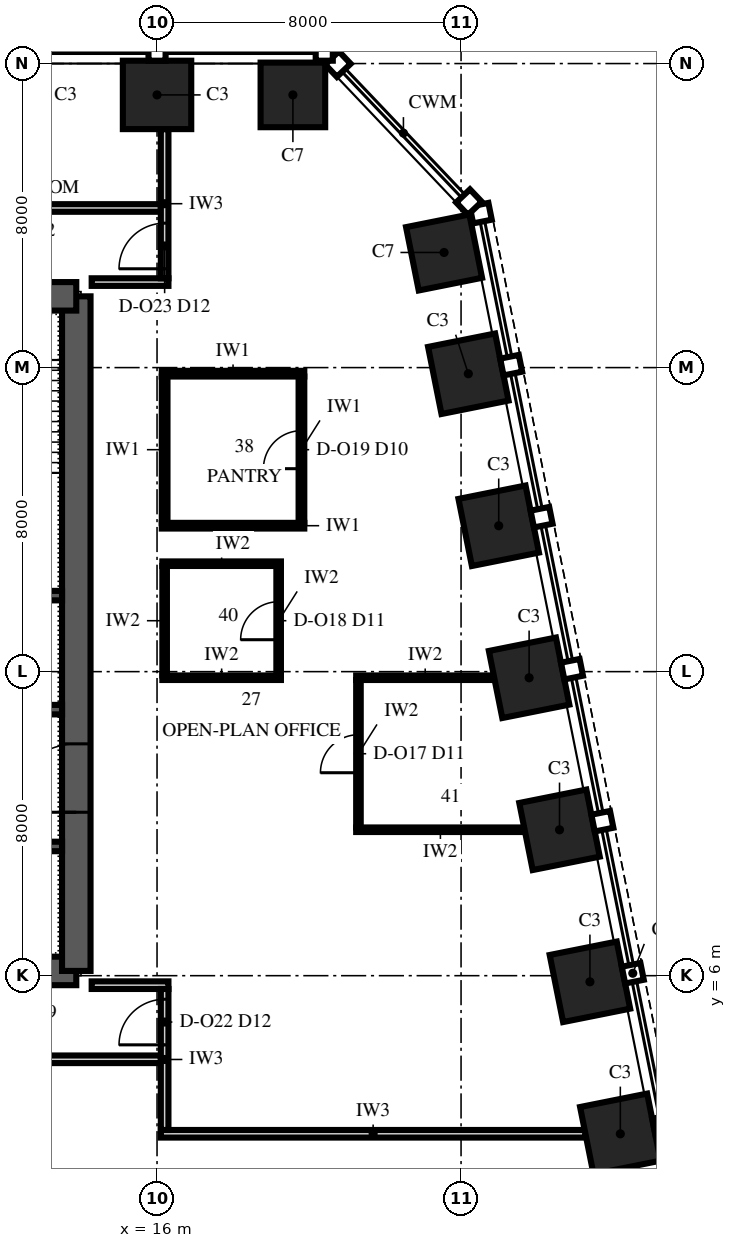
"""IFC4 building model, lengths in metres.
Left out: names, types, materials, properties, quantities, classifications, styles, units other than length and angle.
Written with IfcOpenShell. Run it as: python <this file> out.ifc"""

import sys

from ifc_helpers import new_model, si_unit, direction, frame, frame_2d, origin, origin_2d, place, context, subcontext, project, spatial, polyline, rectangle, outline, extrude, element, fill, save


model = new_model("IFC4")
c1 = context("Model", 3, precision=1e-05, world=origin(), true_north=direction((0.0, 1.0)))
c2 = subcontext(c1, "Body", "Model", "MODEL_VIEW")
j1 = project(units=[si_unit("LENGTHUNIT", "METRE"), si_unit("PLANEANGLEUNIT", "RADIAN")], contexts=[c1])
p1 = place(None, origin())
s1 = spatial("IfcSite", under=j1, at=p1, CompositionType="ELEMENT")
p2 = place(p1, origin())
s2 = spatial("IfcBuilding", under=s1, at=p2, CompositionType="ELEMENT")
p3 = place(p2, frame((0.0, 0.0, 115.0)))
s3 = spatial("IfcBuildingStorey", under=s2, at=p3, CompositionType="ELEMENT", Elevation=115.0)
for number, where, z_axis, x_axis in (
    (1, (28.191, 1.838, 0.0), (0.0, 0.0, 1.0), (-0.196, 0.981, 0.0)),
    (2, (27.391, 5.838, 0.0), (0.0, 0.0, 1.0), (-0.196, 0.981, 0.0)),
    (3, (26.591, 9.838, 0.0), (0.0, 0.0, 1.0), (-0.196, 0.981, 0.0)),
    (4, (25.791, 13.838, 0.0), (0.0, 0.0, 1.0), (-0.196, 0.981, 0.0)),
    (5, (24.991, 17.838, 0.0), (0.0, 0.0, 1.0), (-0.196, 0.981, 0.0)),
    (6, (24.191, 21.838, 0.0), (0.0, 0.0, 1.0), (-0.196, 0.981, 0.0)),
):
    element("IfcColumn", number, at=place(p3, frame(where, z_axis=z_axis, x_axis=x_axis)), inside=s3, PredefinedType="COLUMN", context=c2, shape_type="SweptSolid", body=[
        extrude(rectangle(XDim=1.8, YDim=1.8, at=origin_2d()), origin(), (0.0, 0.0, 1.0), 4.0),
    ])
for number, where, z_axis, x_axis in (
    (7, (23.553, 25.029, 0.0), (0.0, 0.0, 1.0), (-0.196, 0.981, 0.0)),
    (8, (19.575, 29.175, 0.0), (0.0, 0.0, 1.0), (-1.0, 0.0, 0.0)),
):
    element("IfcColumn", number, at=place(p3, frame(where, z_axis=z_axis, x_axis=x_axis)), inside=s3, PredefinedType="COLUMN", context=c2, shape_type="SweptSolid", body=[
        extrude(rectangle(XDim=1.7, YDim=1.7, at=origin_2d()), origin(), (0.0, 0.0, 1.0), 4.0),
    ])
p4 = place(p3, frame((16.0, 29.175, 0.0), z_axis=(0.0, 0.0, 1.0), x_axis=(-1.0, 0.0, 0.0)))
e9 = element("IfcColumn", 9, at=p4, inside=s3, PredefinedType="COLUMN", context=c2, shape_type="SweptSolid", body=[
    extrude(rectangle(XDim=1.8, YDim=1.8, at=origin_2d()), origin(), (0.0, 0.0, 1.0), 4.0),
])
p5 = place(p3, frame((-13.875, 6.125, 0.0), z_axis=(0.0, 0.0, 1.0), x_axis=(1.0, 0.0, 0.0)))
e10 = element("IfcWall", 10, at=p5, inside=s3, PredefinedType="SHEAR", context=c2, shape_type="SweptSolid", body=[
    extrude(rectangle(XDim=27.75, YDim=0.75, at=frame_2d((13.875, 0.0))), origin(), (0.0, 0.0, 1.0), 4.0),
])
p6 = place(p3, frame((13.875, 6.125, 0.0), z_axis=(0.0, 0.0, 1.0), x_axis=(0.0, 1.0, 0.0)))
e11 = element("IfcWall", 11, at=p6, inside=s3, PredefinedType="SHEAR", context=c2, shape_type="SweptSolid", body=[
    extrude(outline(polyline([(0.0, -0.375), (17.75, -0.375), (17.75, 0.0), (17.375, 0.0), (17.375, 0.375), (0.375, 0.375), (0.375, 0.0), (0.0, 0.0), (0.0, -0.375)])), origin(), (0.0, 0.0, 1.0), 4.0),
])
p7 = place(p6, frame((4.175, 0.0, 0.0)))
e12 = element("IfcOpeningElement", 12, at=p7, cuts=e11, PredefinedType="OPENING", context=c2, shape_type="SweptSolid", body=[
    extrude(rectangle(XDim=1.8, YDim=2.4, at=frame_2d((0.9, 1.2))), frame((0.0, 0.39, 0.0), z_axis=(0.0, -1.0, 0.0), x_axis=(1.0, 0.0, 0.0)), (0.0, 0.0, 1.0), 0.78),
])
p8 = place(p3, frame((13.875, 23.875, 0.0), z_axis=(0.0, 0.0, 1.0), x_axis=(-1.0, 0.0, 0.0)))
e13 = element("IfcWall", 13, at=p8, inside=s3, PredefinedType="SHEAR", context=c2, shape_type="SweptSolid", body=[
    extrude(rectangle(XDim=27.75, YDim=0.75, at=frame_2d((13.875, 0.0))), origin(), (0.0, 0.0, 1.0), 4.0),
])
p9 = place(p8, frame((21.775, 0.0, 0.0)))
e14 = element("IfcOpeningElement", 14, at=p9, cuts=e13, PredefinedType="OPENING", context=c2, shape_type="SweptSolid", body=[
    extrude(rectangle(XDim=1.0, YDim=2.1, at=frame_2d((0.5, 1.05))), frame((0.0, 0.39, 0.0), z_axis=(0.0, -1.0, 0.0), x_axis=(1.0, 0.0, 0.0)), (0.0, 0.0, 1.0), 0.78),
])
p10 = place(p8, frame((4.975, 0.0, 0.0)))
e15 = element("IfcOpeningElement", 15, at=p10, cuts=e13, PredefinedType="OPENING", context=c2, shape_type="SweptSolid", body=[
    extrude(rectangle(XDim=1.0, YDim=2.1, at=frame_2d((0.5, 1.05))), frame((0.0, 0.39, 0.0), z_axis=(0.0, -1.0, 0.0), x_axis=(1.0, 0.0, 0.0)), (0.0, 0.0, 1.0), 0.78),
])
p11 = place(p8, frame((17.375, 0.0, 0.0)))
e16 = element("IfcOpeningElement", 16, at=p11, cuts=e13, PredefinedType="OPENING", context=c2, shape_type="SweptSolid", body=[
    extrude(rectangle(XDim=1.0, YDim=2.1, at=frame_2d((0.5, 1.05))), frame((0.0, 0.39, 0.0), z_axis=(0.0, -1.0, 0.0), x_axis=(1.0, 0.0, 0.0)), (0.0, 0.0, 1.0), 0.78),
])
p12 = place(p8, frame((13.375, 0.0, 0.0)))
e17 = element("IfcOpeningElement", 17, at=p12, cuts=e13, PredefinedType="OPENING", context=c2, shape_type="SweptSolid", body=[
    extrude(rectangle(XDim=1.0, YDim=2.1, at=frame_2d((0.5, 1.05))), frame((0.0, 0.39, 0.0), z_axis=(0.0, -1.0, 0.0), x_axis=(1.0, 0.0, 0.0)), (0.0, 0.0, 1.0), 0.78),
])
p13 = place(p8, frame((9.375, 0.0, 0.0)))
e18 = element("IfcOpeningElement", 18, at=p13, cuts=e13, PredefinedType="OPENING", context=c2, shape_type="SweptSolid", body=[
    extrude(rectangle(XDim=1.0, YDim=2.1, at=frame_2d((0.5, 1.05))), frame((0.0, 0.39, 0.0), z_axis=(0.0, -1.0, 0.0), x_axis=(1.0, 0.0, 0.0)), (0.0, 0.0, 1.0), 0.78),
])
p14 = place(p3, frame((-13.5, 9.4, 0.0), z_axis=(0.0, 0.0, 1.0), x_axis=(1.0, 0.0, 0.0)))
e19 = element("IfcWall", 19, at=p14, inside=s3, PredefinedType="SHEAR", context=c2, shape_type="SweptSolid", body=[
    extrude(rectangle(XDim=27.0, YDim=0.25, at=frame_2d((13.5, 0.0))), origin(), (0.0, 0.0, 1.0), 4.0),
])
p15 = place(p14, frame((0.35, 0.0, 0.0)))
e20 = element("IfcOpeningElement", 20, at=p15, cuts=e19, PredefinedType="OPENING", context=c2, shape_type="SweptSolid", body=[
    extrude(rectangle(XDim=1.1, YDim=2.1, at=frame_2d((0.55, 1.05))), frame((0.0, 0.14, 0.0), z_axis=(0.0, -1.0, 0.0), x_axis=(1.0, 0.0, 0.0)), (0.0, 0.0, 1.0), 0.28),
])
p16 = place(p14, frame((3.15, 0.0, 0.0)))
e21 = element("IfcOpeningElement", 21, at=p16, cuts=e19, PredefinedType="OPENING", context=c2, shape_type="SweptSolid", body=[
    extrude(rectangle(XDim=1.1, YDim=2.1, at=frame_2d((0.55, 1.05))), frame((0.0, 0.14, 0.0), z_axis=(0.0, -1.0, 0.0), x_axis=(1.0, 0.0, 0.0)), (0.0, 0.0, 1.0), 0.28),
])
p17 = place(p14, frame((5.95, 0.0, 0.0)))
e22 = element("IfcOpeningElement", 22, at=p17, cuts=e19, PredefinedType="OPENING", context=c2, shape_type="SweptSolid", body=[
    extrude(rectangle(XDim=1.1, YDim=2.1, at=frame_2d((0.55, 1.05))), frame((0.0, 0.14, 0.0), z_axis=(0.0, -1.0, 0.0), x_axis=(1.0, 0.0, 0.0)), (0.0, 0.0, 1.0), 0.28),
])
p18 = place(p3, frame((-13.5, 13.0, 0.0), z_axis=(0.0, 0.0, 1.0), x_axis=(1.0, 0.0, 0.0)))
e23 = element("IfcWall", 23, at=p18, inside=s3, PredefinedType="SHEAR", context=c2, shape_type="SweptSolid", body=[
    extrude(rectangle(XDim=27.0, YDim=0.25, at=frame_2d((13.5, 0.0))), origin(), (0.0, 0.0, 1.0), 4.0),
])
p19 = place(p18, frame((0.35, 0.0, 0.0)))
e24 = element("IfcOpeningElement", 24, at=p19, cuts=e23, PredefinedType="OPENING", context=c2, shape_type="SweptSolid", body=[
    extrude(rectangle(XDim=1.1, YDim=2.1, at=frame_2d((0.55, 1.05))), frame((0.0, 0.14, 0.0), z_axis=(0.0, -1.0, 0.0), x_axis=(1.0, 0.0, 0.0)), (0.0, 0.0, 1.0), 0.28),
])
p20 = place(p18, frame((3.15, 0.0, 0.0)))
e25 = element("IfcOpeningElement", 25, at=p20, cuts=e23, PredefinedType="OPENING", context=c2, shape_type="SweptSolid", body=[
    extrude(rectangle(XDim=1.1, YDim=2.1, at=frame_2d((0.55, 1.05))), frame((0.0, 0.14, 0.0), z_axis=(0.0, -1.0, 0.0), x_axis=(1.0, 0.0, 0.0)), (0.0, 0.0, 1.0), 0.28),
])
p21 = place(p18, frame((5.95, 0.0, 0.0)))
e26 = element("IfcOpeningElement", 26, at=p21, cuts=e23, PredefinedType="OPENING", context=c2, shape_type="SweptSolid", body=[
    extrude(rectangle(XDim=1.1, YDim=2.1, at=frame_2d((0.55, 1.05))), frame((0.0, 0.14, 0.0), z_axis=(0.0, -1.0, 0.0), x_axis=(1.0, 0.0, 0.0)), (0.0, 0.0, 1.0), 0.28),
])
p22 = place(p18, frame((16.65, 0.0, 0.0)))
e27 = element("IfcOpeningElement", 27, at=p22, cuts=e23, PredefinedType="OPENING", context=c2, shape_type="SweptSolid", body=[
    extrude(rectangle(XDim=0.9, YDim=2.1, at=frame_2d((0.45, 1.05))), frame((0.0, 0.14, 0.0), z_axis=(0.0, -1.0, 0.0), x_axis=(1.0, 0.0, 0.0)), (0.0, 0.0, 1.0), 0.28),
])
p23 = place(p18, frame((21.05, 0.0, 0.0)))
e28 = element("IfcOpeningElement", 28, at=p23, cuts=e23, PredefinedType="OPENING", context=c2, shape_type="SweptSolid", body=[
    extrude(rectangle(XDim=0.9, YDim=2.1, at=frame_2d((0.45, 1.05))), frame((0.0, 0.14, 0.0), z_axis=(0.0, -1.0, 0.0), x_axis=(1.0, 0.0, 0.0)), (0.0, 0.0, 1.0), 0.28),
])
p24 = place(p3, frame((-13.5, 16.0, 0.0), z_axis=(0.0, 0.0, 1.0), x_axis=(1.0, 0.0, 0.0)))
e29 = element("IfcWall", 29, at=p24, inside=s3, PredefinedType="SHEAR", context=c2, shape_type="SweptSolid", body=[
    extrude(rectangle(XDim=27.0, YDim=0.25, at=frame_2d((13.5, 0.0))), origin(), (0.0, 0.0, 1.0), 4.0),
])
p25 = place(p3, frame((16.1, 1.84, 0.0), z_axis=(0.0, 0.0, 1.0), x_axis=(1.0, 0.0, 0.0)))
e30 = element("IfcWall", 30, at=p25, inside=s3, PredefinedType="PARTITIONING", context=c2, shape_type="SweptSolid", body=[
    extrude(rectangle(XDim=11.173, YDim=0.2, at=frame_2d((5.586, 0.0))), origin(), (0.0, 0.0, 1.0), 3.25),
])
p26 = place(p3, frame((-16.1, 3.8, 0.0), z_axis=(0.0, 0.0, 1.0), x_axis=(1.0, 0.0, 0.0)))
e31 = element("IfcWall", 31, at=p26, inside=s3, PredefinedType="PARTITIONING", context=c2, shape_type="SweptSolid", body=[
    extrude(rectangle(XDim=32.2, YDim=0.2, at=frame_2d((16.1, 0.0))), origin(), (0.0, 0.0, 1.0), 3.25),
])
p27 = place(p26, frame((15.5, 0.0, 0.0)))
e32 = element("IfcOpeningElement", 32, at=p27, cuts=e31, PredefinedType="OPENING", context=c2, shape_type="SweptSolid", body=[
    extrude(rectangle(XDim=1.2, YDim=2.4, at=frame_2d((0.6, 1.2))), frame((0.0, 0.115, 0.0), z_axis=(0.0, -1.0, 0.0), x_axis=(1.0, 0.0, 0.0)), (0.0, 0.0, 1.0), 0.23),
])
p28 = place(p3, frame((14.28, 5.75, 0.0), z_axis=(0.0, 0.0, 1.0), x_axis=(1.0, 0.0, 0.0)))
e33 = element("IfcWall", 33, at=p28, inside=s3, PredefinedType="PARTITIONING", context=c2, shape_type="SweptSolid", body=[
    extrude(rectangle(XDim=2.02, YDim=0.2, at=frame_2d((1.01, 0.0))), origin(), (0.0, 0.0, 1.0), 3.85),
])
p29 = place(p3, frame((21.24, 9.84, 0.0), z_axis=(0.0, 0.0, 1.0), x_axis=(1.0, 0.0, 0.0)))
e34 = element("IfcWall", 34, at=p29, inside=s3, PredefinedType="PARTITIONING", context=c2, shape_type="SweptSolid", body=[
    extrude(rectangle(XDim=4.433, YDim=0.12, at=frame_2d((2.216, 0.0))), origin(), (0.0, 0.0, 1.0), 3.25),
])
p30 = place(p3, frame((16.14, 13.84, 0.0), z_axis=(0.0, 0.0, 1.0), x_axis=(1.0, 0.0, 0.0)))
e35 = element("IfcWall", 35, at=p30, inside=s3, PredefinedType="PARTITIONING", context=c2, shape_type="SweptSolid", body=[
    extrude(rectangle(XDim=3.12, YDim=0.12, at=frame_2d((1.56, 0.0))), origin(), (0.0, 0.0, 1.0), 3.85),
])
p31 = place(p3, frame((21.24, 13.84, 0.0), z_axis=(0.0, 0.0, 1.0), x_axis=(1.0, 0.0, 0.0)))
e36 = element("IfcWall", 36, at=p31, inside=s3, PredefinedType="PARTITIONING", context=c2, shape_type="SweptSolid", body=[
    extrude(rectangle(XDim=3.633, YDim=0.12, at=frame_2d((1.816, 0.0))), origin(), (0.0, 0.0, 1.0), 3.25),
])
p32 = place(p3, frame((16.14, 16.84, 0.0), z_axis=(0.0, 0.0, 1.0), x_axis=(1.0, 0.0, 0.0)))
e37 = element("IfcWall", 37, at=p32, inside=s3, PredefinedType="PARTITIONING", context=c2, shape_type="SweptSolid", body=[
    extrude(rectangle(XDim=3.12, YDim=0.12, at=frame_2d((1.56, 0.0))), origin(), (0.0, 0.0, 1.0), 3.85),
])
p33 = place(p3, frame((16.125, 17.84, 0.0), z_axis=(0.0, 0.0, 1.0), x_axis=(1.0, 0.0, 0.0)))
e38 = element("IfcWall", 38, at=p33, inside=s3, PredefinedType="PARTITIONING", context=c2, shape_type="SweptSolid", body=[
    extrude(rectangle(XDim=3.75, YDim=0.15, at=frame_2d((1.875, 0.0))), origin(), (0.0, 0.0, 1.0), 3.25),
])
p34 = place(p3, frame((16.125, 21.84, 0.0), z_axis=(0.0, 0.0, 1.0), x_axis=(1.0, 0.0, 0.0)))
e39 = element("IfcWall", 39, at=p34, inside=s3, PredefinedType="PARTITIONING", context=c2, shape_type="SweptSolid", body=[
    extrude(rectangle(XDim=3.75, YDim=0.15, at=frame_2d((1.875, 0.0))), origin(), (0.0, 0.0, 1.0), 3.4),
])
p35 = place(p3, frame((14.28, 24.25, 0.0), z_axis=(0.0, 0.0, 1.0), x_axis=(1.0, 0.0, 0.0)))
e40 = element("IfcWall", 40, at=p35, inside=s3, PredefinedType="PARTITIONING", context=c2, shape_type="SweptSolid", body=[
    extrude(rectangle(XDim=2.02, YDim=0.2, at=frame_2d((1.01, 0.0))), origin(), (0.0, 0.0, 1.0), 3.4),
])
p36 = place(p3, frame((-16.1, 26.2, 0.0), z_axis=(0.0, 0.0, 1.0), x_axis=(1.0, 0.0, 0.0)))
e41 = element("IfcWall", 41, at=p36, inside=s3, PredefinedType="PARTITIONING", context=c2, shape_type="SweptSolid", body=[
    extrude(rectangle(XDim=32.2, YDim=0.2, at=frame_2d((16.1, 0.0))), origin(), (0.0, 0.0, 1.0), 3.4),
])
p37 = place(p36, frame((3.4, 0.0, 0.0)))
e42 = element("IfcOpeningElement", 42, at=p37, cuts=e41, PredefinedType="OPENING", context=c2, shape_type="SweptSolid", body=[
    extrude(rectangle(XDim=1.2, YDim=2.4, at=frame_2d((0.6, 1.2))), frame((0.0, 0.115, 0.0), z_axis=(0.0, -1.0, 0.0), x_axis=(1.0, 0.0, 0.0)), (0.0, 0.0, 1.0), 0.23),
])
p38 = place(p36, frame((9.5, 0.0, 0.0)))
e43 = element("IfcOpeningElement", 43, at=p38, cuts=e41, PredefinedType="OPENING", context=c2, shape_type="SweptSolid", body=[
    extrude(rectangle(XDim=1.2, YDim=2.4, at=frame_2d((0.6, 1.2))), frame((0.0, 0.115, 0.0), z_axis=(0.0, -1.0, 0.0), x_axis=(1.0, 0.0, 0.0)), (0.0, 0.0, 1.0), 0.23),
])
p39 = place(p36, frame((13.5, 0.0, 0.0)))
e44 = element("IfcOpeningElement", 44, at=p39, cuts=e41, PredefinedType="OPENING", context=c2, shape_type="SweptSolid", body=[
    extrude(rectangle(XDim=1.2, YDim=2.4, at=frame_2d((0.6, 1.2))), frame((0.0, 0.115, 0.0), z_axis=(0.0, -1.0, 0.0), x_axis=(1.0, 0.0, 0.0)), (0.0, 0.0, 1.0), 0.23),
])
p40 = place(p36, frame((17.5, 0.0, 0.0)))
e45 = element("IfcOpeningElement", 45, at=p40, cuts=e41, PredefinedType="OPENING", context=c2, shape_type="SweptSolid", body=[
    extrude(rectangle(XDim=1.2, YDim=2.4, at=frame_2d((0.6, 1.2))), frame((0.0, 0.115, 0.0), z_axis=(0.0, -1.0, 0.0), x_axis=(1.0, 0.0, 0.0)), (0.0, 0.0, 1.0), 0.23),
])
p41 = place(p36, frame((21.5, 0.0, 0.0)))
e46 = element("IfcOpeningElement", 46, at=p41, cuts=e41, PredefinedType="OPENING", context=c2, shape_type="SweptSolid", body=[
    extrude(rectangle(XDim=1.2, YDim=2.4, at=frame_2d((0.6, 1.2))), frame((0.0, 0.115, 0.0), z_axis=(0.0, -1.0, 0.0), x_axis=(1.0, 0.0, 0.0)), (0.0, 0.0, 1.0), 0.23),
])
p42 = place(p36, frame((27.6, 0.0, 0.0)))
e47 = element("IfcOpeningElement", 47, at=p42, cuts=e41, PredefinedType="OPENING", context=c2, shape_type="SweptSolid", body=[
    extrude(rectangle(XDim=1.2, YDim=2.4, at=frame_2d((0.6, 1.2))), frame((0.0, 0.115, 0.0), z_axis=(0.0, -1.0, 0.0), x_axis=(1.0, 0.0, 0.0)), (0.0, 0.0, 1.0), 0.23),
])
p43 = place(p3, frame((16.2, 1.94, 0.0), z_axis=(0.0, 0.0, 1.0), x_axis=(0.0, 1.0, 0.0)))
e48 = element("IfcWall", 48, at=p43, inside=s3, PredefinedType="PARTITIONING", context=c2, shape_type="SweptSolid", body=[
    extrude(rectangle(XDim=3.71, YDim=0.2, at=frame_2d((1.855, 0.0))), origin(), (0.0, 0.0, 1.0), 3.85),
])
p44 = place(p43, frame((2.24, 0.0, 0.0)))
e49 = element("IfcOpeningElement", 49, at=p44, cuts=e48, PredefinedType="OPENING", context=c2, shape_type="SweptSolid", body=[
    extrude(rectangle(XDim=1.2, YDim=2.4, at=frame_2d((0.6, 1.2))), frame((0.0, 0.115, 0.0), z_axis=(0.0, -1.0, 0.0), x_axis=(1.0, 0.0, 0.0)), (0.0, 0.0, 1.0), 0.23),
])
p45 = place(p3, frame((16.2, 13.9, 0.0), z_axis=(0.0, 0.0, 1.0), x_axis=(0.0, 1.0, 0.0)))
e50 = element("IfcWall", 50, at=p45, inside=s3, PredefinedType="PARTITIONING", context=c2, shape_type="SweptSolid", body=[
    extrude(rectangle(XDim=2.88, YDim=0.12, at=frame_2d((1.44, 0.0))), origin(), (0.0, 0.0, 1.0), 3.25),
])
p46 = place(p3, frame((16.2, 17.915, 0.0), z_axis=(0.0, 0.0, 1.0), x_axis=(0.0, 1.0, 0.0)))
e51 = element("IfcWall", 51, at=p46, inside=s3, PredefinedType="PARTITIONING", context=c2, shape_type="SweptSolid", body=[
    extrude(rectangle(XDim=3.85, YDim=0.15, at=frame_2d((1.925, 0.0))), origin(), (0.0, 0.0, 1.0), 3.25),
])
p47 = place(p3, frame((16.2, 24.35, 0.0), z_axis=(0.0, 0.0, 1.0), x_axis=(0.0, 1.0, 0.0)))
e52 = element("IfcWall", 52, at=p47, inside=s3, PredefinedType="PARTITIONING", context=c2, shape_type="SweptSolid", body=[
    extrude(rectangle(XDim=3.925, YDim=0.2, at=frame_2d((1.962, 0.0))), origin(), (0.0, 0.0, 1.0), 3.4),
])
p48 = place(p47, frame((0.25, 0.0, 0.0)))
e53 = element("IfcOpeningElement", 53, at=p48, cuts=e52, PredefinedType="OPENING", context=c2, shape_type="SweptSolid", body=[
    extrude(rectangle(XDim=1.2, YDim=2.4, at=frame_2d((0.6, 1.2))), frame((0.0, 0.115, 0.0), z_axis=(0.0, -1.0, 0.0), x_axis=(1.0, 0.0, 0.0)), (0.0, 0.0, 1.0), 0.23),
])
p49 = place(p3, frame((19.2, 13.9, 0.0), z_axis=(0.0, 0.0, 1.0), x_axis=(0.0, 1.0, 0.0)))
e54 = element("IfcWall", 54, at=p49, inside=s3, PredefinedType="PARTITIONING", context=c2, shape_type="SweptSolid", body=[
    extrude(rectangle(XDim=2.88, YDim=0.12, at=frame_2d((1.44, 0.0))), origin(), (0.0, 0.0, 1.0), 3.25),
])
p50 = place(p49, frame((0.94, 0.0, 0.0)))
e55 = element("IfcOpeningElement", 55, at=p50, cuts=e54, PredefinedType="OPENING", context=c2, shape_type="SweptSolid", body=[
    extrude(rectangle(XDim=1.0, YDim=2.4, at=frame_2d((0.5, 1.2))), frame((0.0, 0.075, 0.0), z_axis=(0.0, -1.0, 0.0), x_axis=(1.0, 0.0, 0.0)), (0.0, 0.0, 1.0), 0.15),
])
p51 = place(p3, frame((19.8, 17.915, 0.0), z_axis=(0.0, 0.0, 1.0), x_axis=(0.0, 1.0, 0.0)))
e56 = element("IfcWall", 56, at=p51, inside=s3, PredefinedType="PARTITIONING", context=c2, shape_type="SweptSolid", body=[
    extrude(rectangle(XDim=3.85, YDim=0.15, at=frame_2d((1.925, 0.0))), origin(), (0.0, 0.0, 1.0), 3.25),
])
p52 = place(p51, frame((1.425, 0.0, 0.0)))
e57 = element("IfcOpeningElement", 57, at=p52, cuts=e56, PredefinedType="OPENING", context=c2, shape_type="SweptSolid", body=[
    extrude(rectangle(XDim=1.0, YDim=2.3, at=frame_2d((0.5, 1.15))), frame((0.0, 0.09, 0.0), z_axis=(0.0, -1.0, 0.0), x_axis=(1.0, 0.0, 0.0)), (0.0, 0.0, 1.0), 0.18),
])
p53 = place(p3, frame((21.3, 9.9, 0.0), z_axis=(0.0, 0.0, 1.0), x_axis=(0.0, 1.0, 0.0)))
e58 = element("IfcWall", 58, at=p53, inside=s3, PredefinedType="PARTITIONING", context=c2, shape_type="SweptSolid", body=[
    extrude(rectangle(XDim=3.88, YDim=0.12, at=frame_2d((1.94, 0.0))), origin(), (0.0, 0.0, 1.0), 3.85),
])
p54 = place(p53, frame((1.44, 0.0, 0.0)))
e59 = element("IfcOpeningElement", 59, at=p54, cuts=e58, PredefinedType="OPENING", context=c2, shape_type="SweptSolid", body=[
    extrude(rectangle(XDim=1.0, YDim=2.4, at=frame_2d((0.5, 1.2))), frame((0.0, 0.075, 0.0), z_axis=(0.0, -1.0, 0.0), x_axis=(1.0, 0.0, 0.0)), (0.0, 0.0, 1.0), 0.15),
])
p55 = place(p7, origin())
e60 = element("IfcDoor", 60, at=p55, inside=s3, OperationType="DOUBLE_DOOR_SINGLE_SWING", PredefinedType="DOOR", context=c2, shape_type="SweptSolid", body=[
    extrude(rectangle(XDim=1.8, YDim=2.4, at=frame_2d((0.9, 1.2))), frame((0.0, 0.375, 0.0), z_axis=(0.0, -1.0, 0.0), x_axis=(1.0, 0.0, 0.0)), (0.0, 0.0, 1.0), 0.75),
])
fill(e12, e60)
p56 = place(p54, origin())
e61 = element("IfcDoor", 61, at=p56, inside=s3, OperationType="SINGLE_SWING_RIGHT", PredefinedType="DOOR", context=c2, shape_type="SweptSolid", body=[
    extrude(rectangle(XDim=1.0, YDim=2.4, at=frame_2d((0.5, 1.2))), frame((0.0, 0.06, 0.0), z_axis=(0.0, -1.0, 0.0), x_axis=(1.0, 0.0, 0.0)), (0.0, 0.0, 1.0), 0.12),
])
fill(e59, e61)
p57 = place(p50, origin())
e62 = element("IfcDoor", 62, at=p57, inside=s3, OperationType="SINGLE_SWING_RIGHT", PredefinedType="DOOR", context=c2, shape_type="SweptSolid", body=[
    extrude(rectangle(XDim=1.0, YDim=2.4, at=frame_2d((0.5, 1.2))), frame((0.0, 0.06, 0.0), z_axis=(0.0, -1.0, 0.0), x_axis=(1.0, 0.0, 0.0)), (0.0, 0.0, 1.0), 0.12),
])
fill(e55, e62)
p58 = place(p52, origin())
e63 = element("IfcDoor", 63, at=p58, inside=s3, OperationType="SINGLE_SWING_LEFT", PredefinedType="DOOR", context=c2, shape_type="SweptSolid", body=[
    extrude(rectangle(XDim=1.0, YDim=2.3, at=frame_2d((0.5, 1.15))), frame((0.0, 0.075, 0.0), z_axis=(0.0, -1.0, 0.0), x_axis=(1.0, 0.0, 0.0)), (0.0, 0.0, 1.0), 0.149),
])
fill(e57, e63)
p59 = place(p44, origin())
e64 = element("IfcDoor", 64, at=p59, inside=s3, OperationType="SINGLE_SWING_LEFT", PredefinedType="DOOR", context=c2, shape_type="SweptSolid", body=[
    extrude(rectangle(XDim=1.2, YDim=2.4, at=frame_2d((0.6, 1.2))), frame((0.0, 0.1, 0.0), z_axis=(0.0, -1.0, 0.0), x_axis=(1.0, 0.0, 0.0)), (0.0, 0.0, 1.0), 0.199),
])
fill(e49, e64)
p60 = place(p48, origin())
e65 = element("IfcDoor", 65, at=p60, inside=s3, OperationType="SINGLE_SWING_LEFT", PredefinedType="DOOR", context=c2, shape_type="SweptSolid", body=[
    extrude(rectangle(XDim=1.2, YDim=2.4, at=frame_2d((0.6, 1.2))), frame((0.0, 0.1, 0.0), z_axis=(0.0, -1.0, 0.0), x_axis=(1.0, 0.0, 0.0)), (0.0, 0.0, 1.0), 0.199),
])
fill(e53, e65)
save(model, sys.argv[1])
